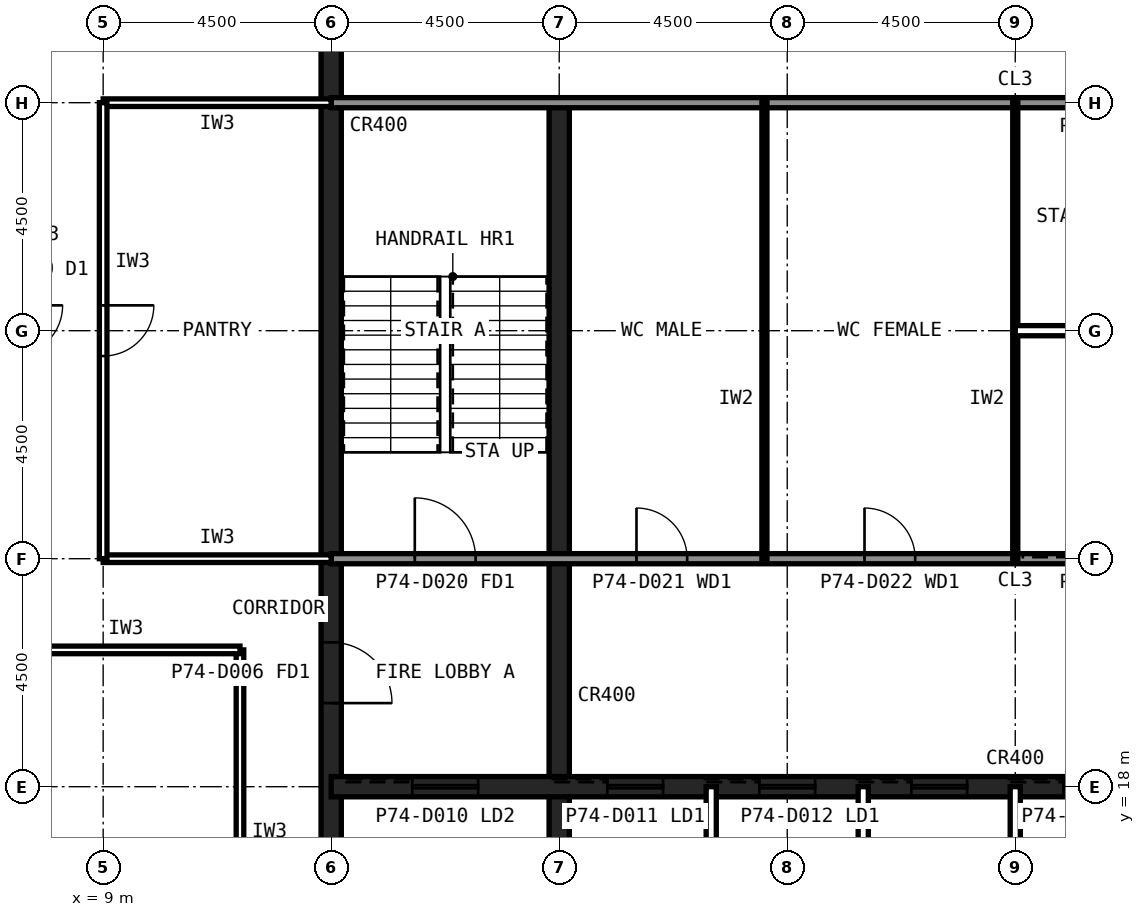
"""IFC4 building model, lengths in metres.
Left out: names, types, materials, properties, quantities, classifications, styles, units other than length and angle.
Written with IfcOpenShell. Run it as: python <this file> out.ifc"""

import sys

from ifc_helpers import new_model, si_unit, direction, frame, frame_2d, origin, place, context, subcontext, project, spatial, rectangle, extrude, element, fill, save


model = new_model("IFC4")
c1 = context("Model", 3, precision=1e-05, world=origin(), true_north=direction((0.0, 1.0)))
c2 = subcontext(c1, "Body", "Model", "MODEL_VIEW")
j1 = project(units=[si_unit("LENGTHUNIT", "METRE"), si_unit("PLANEANGLEUNIT", "RADIAN")], contexts=[c1])
p1 = place(None, origin())
s1 = spatial("IfcSite", under=j1, at=p1, CompositionType="ELEMENT")
p2 = place(p1, origin())
s2 = spatial("IfcBuilding", under=s1, at=p2, CompositionType="ELEMENT")
p3 = place(p2, frame((0.0, 0.0, 310.6)))
s3 = spatial("IfcBuildingStorey", under=s2, at=p3, CompositionType="ELEMENT", Elevation=310.6)
p4 = place(p3, frame((13.5, 40.5, 0.0), z_axis=(0.0, 0.0, 1.0), x_axis=(0.0, -1.0, 0.0)))
e1 = element("IfcWall", 1, at=p4, inside=s3, PredefinedType="SHEAR", context=c2, shape_type="SweptSolid", body=[
    extrude(rectangle(XDim=27.0, YDim=0.4, at=frame_2d((13.5, 0.0))), origin(), (0.0, 0.0, 1.0), 4.5),
])
p5 = place(p4, frame((19.65, 0.0, 0.0)))
e2 = element("IfcOpeningElement", 2, at=p5, cuts=e1, PredefinedType="OPENING", context=c2, shape_type="SweptSolid", body=[
    extrude(rectangle(XDim=1.2, YDim=2.1, at=frame_2d((0.6, 1.05))), frame((0.0, 0.21, 0.0), z_axis=(0.0, -1.0, 0.0), x_axis=(1.0, 0.0, 0.0)), (0.0, 0.0, 1.0), 0.42),
])
p6 = place(p4, frame((5.85, 0.0, 0.0)))
e3 = element("IfcOpeningElement", 3, at=p6, cuts=e1, PredefinedType="OPENING", context=c2, shape_type="SweptSolid", body=[
    extrude(rectangle(XDim=1.8, YDim=2.1, at=frame_2d((0.9, 1.05))), frame((0.0, 0.21, 0.0), z_axis=(0.0, -1.0, 0.0), x_axis=(1.0, 0.0, 0.0)), (0.0, 0.0, 1.0), 0.42),
])
p7 = place(p3, frame((18.0, 13.5, 0.0), z_axis=(0.0, 0.0, 1.0), x_axis=(0.0, 1.0, 0.0)))
e4 = element("IfcWall", 4, at=p7, inside=s3, PredefinedType="SHEAR", context=c2, shape_type="SweptSolid", body=[
    extrude(rectangle(XDim=18.0, YDim=0.4, at=frame_2d((9.0, 0.0))), origin(), (0.0, 0.0, 1.0), 4.5),
])
p8 = place(p3, frame((13.5, 18.0, 0.0), z_axis=(0.0, 0.0, 1.0), x_axis=(1.0, 0.0, 0.0)))
e5 = element("IfcWall", 5, at=p8, inside=s3, PredefinedType="SHEAR", context=c2, shape_type="SweptSolid", body=[
    extrude(rectangle(XDim=27.0, YDim=0.4, at=frame_2d((13.5, 0.0))), origin(), (0.0, 0.0, 1.0), 4.5),
])
p9 = place(p8, frame((24.3, 0.0, 0.0)))
e6 = element("IfcOpeningElement", 6, at=p9, cuts=e5, PredefinedType="OPENING", context=c2, shape_type="SweptSolid", body=[
    extrude(rectangle(XDim=0.9, YDim=2.1, at=frame_2d((0.45, 1.05))), frame((0.0, 0.21, 0.0), z_axis=(0.0, -1.0, 0.0), x_axis=(1.0, 0.0, 0.0)), (0.0, 0.0, 1.0), 0.42),
])
p10 = place(p8, frame((5.45, 0.0, 0.0)))
e7 = element("IfcOpeningElement", 7, at=p10, cuts=e5, PredefinedType="OPENING", context=c2, shape_type="SweptSolid", body=[
    extrude(rectangle(XDim=1.1, YDim=2.1, at=frame_2d((0.55, 1.05))), frame((0.0, 0.21, 0.0), z_axis=(0.0, -1.0, 0.0), x_axis=(1.0, 0.0, 0.0)), (0.0, 0.0, 1.0), 0.42),
])
p11 = place(p8, frame((8.45, 0.0, 0.0)))
e8 = element("IfcOpeningElement", 8, at=p11, cuts=e5, PredefinedType="OPENING", context=c2, shape_type="SweptSolid", body=[
    extrude(rectangle(XDim=1.1, YDim=2.1, at=frame_2d((0.55, 1.05))), frame((0.0, 0.21, 0.0), z_axis=(0.0, -1.0, 0.0), x_axis=(1.0, 0.0, 0.0)), (0.0, 0.0, 1.0), 0.42),
])
p12 = place(p8, frame((11.45, 0.0, 0.0)))
e9 = element("IfcOpeningElement", 9, at=p12, cuts=e5, PredefinedType="OPENING", context=c2, shape_type="SweptSolid", body=[
    extrude(rectangle(XDim=1.1, YDim=2.1, at=frame_2d((0.55, 1.05))), frame((0.0, 0.21, 0.0), z_axis=(0.0, -1.0, 0.0), x_axis=(1.0, 0.0, 0.0)), (0.0, 0.0, 1.0), 0.42),
])
p13 = place(p8, frame((14.45, 0.0, 0.0)))
e10 = element("IfcOpeningElement", 10, at=p13, cuts=e5, PredefinedType="OPENING", context=c2, shape_type="SweptSolid", body=[
    extrude(rectangle(XDim=1.1, YDim=2.1, at=frame_2d((0.55, 1.05))), frame((0.0, 0.21, 0.0), z_axis=(0.0, -1.0, 0.0), x_axis=(1.0, 0.0, 0.0)), (0.0, 0.0, 1.0), 0.42),
])
p14 = place(p8, frame((17.45, 0.0, 0.0)))
e11 = element("IfcOpeningElement", 11, at=p14, cuts=e5, PredefinedType="OPENING", context=c2, shape_type="SweptSolid", body=[
    extrude(rectangle(XDim=1.1, YDim=2.1, at=frame_2d((0.55, 1.05))), frame((0.0, 0.21, 0.0), z_axis=(0.0, -1.0, 0.0), x_axis=(1.0, 0.0, 0.0)), (0.0, 0.0, 1.0), 0.42),
])
p15 = place(p8, frame((20.45, 0.0, 0.0)))
e12 = element("IfcOpeningElement", 12, at=p15, cuts=e5, PredefinedType="OPENING", context=c2, shape_type="SweptSolid", body=[
    extrude(rectangle(XDim=1.1, YDim=2.1, at=frame_2d((0.55, 1.05))), frame((0.0, 0.21, 0.0), z_axis=(0.0, -1.0, 0.0), x_axis=(1.0, 0.0, 0.0)), (0.0, 0.0, 1.0), 0.42),
])
p16 = place(p8, frame((1.6, 0.0, 0.0)))
e13 = element("IfcOpeningElement", 13, at=p16, cuts=e5, PredefinedType="OPENING", context=c2, shape_type="SweptSolid", body=[
    extrude(rectangle(XDim=1.3, YDim=2.2, at=frame_2d((0.65, 1.1))), frame((0.0, 0.21, 0.0), z_axis=(0.0, -1.0, 0.0), x_axis=(1.0, 0.0, 0.0)), (0.0, 0.0, 1.0), 0.42),
])
p17 = place(p3, frame((13.5, 22.5, 0.0), z_axis=(0.0, 0.0, 1.0), x_axis=(1.0, 0.0, 0.0)))
e14 = element("IfcWall", 14, at=p17, inside=s3, PredefinedType="SOLIDWALL", context=c2, shape_type="SweptSolid", body=[
    extrude(rectangle(XDim=27.0, YDim=0.2, at=frame_2d((13.5, 0.0))), origin(), (0.0, 0.0, 1.0), 4.32),
])
p18 = place(p17, frame((1.65, 0.0, 0.0)))
e15 = element("IfcOpeningElement", 15, at=p18, cuts=e14, PredefinedType="OPENING", context=c2, shape_type="SweptSolid", body=[
    extrude(rectangle(XDim=1.2, YDim=2.1, at=frame_2d((0.6, 1.05))), frame((0.0, 0.11, 0.0), z_axis=(0.0, -1.0, 0.0), x_axis=(1.0, 0.0, 0.0)), (0.0, 0.0, 1.0), 0.22),
])
p19 = place(p17, frame((6.025, 0.0, 0.0)))
e16 = element("IfcOpeningElement", 16, at=p19, cuts=e14, PredefinedType="OPENING", context=c2, shape_type="SweptSolid", body=[
    extrude(rectangle(XDim=1.0, YDim=2.1, at=frame_2d((0.5, 1.05))), frame((0.0, 0.11, 0.0), z_axis=(0.0, -1.0, 0.0), x_axis=(1.0, 0.0, 0.0)), (0.0, 0.0, 1.0), 0.22),
])
p20 = place(p17, frame((10.525, 0.0, 0.0)))
e17 = element("IfcOpeningElement", 17, at=p20, cuts=e14, PredefinedType="OPENING", context=c2, shape_type="SweptSolid", body=[
    extrude(rectangle(XDim=1.0, YDim=2.1, at=frame_2d((0.5, 1.05))), frame((0.0, 0.11, 0.0), z_axis=(0.0, -1.0, 0.0), x_axis=(1.0, 0.0, 0.0)), (0.0, 0.0, 1.0), 0.22),
])
p21 = place(p17, frame((19.75, 0.0, 0.0)))
e18 = element("IfcOpeningElement", 18, at=p21, cuts=e14, PredefinedType="OPENING", context=c2, shape_type="SweptSolid", body=[
    extrude(rectangle(XDim=1.0, YDim=2.1, at=frame_2d((0.5, 1.05))), frame((0.0, 0.11, 0.0), z_axis=(0.0, -1.0, 0.0), x_axis=(1.0, 0.0, 0.0)), (0.0, 0.0, 1.0), 0.22),
])
p22 = place(p17, frame((15.05, 0.0, 0.0)))
e19 = element("IfcOpeningElement", 19, at=p22, cuts=e14, PredefinedType="OPENING", context=c2, shape_type="SweptSolid", body=[
    extrude(rectangle(XDim=1.4, YDim=2.4, at=frame_2d((0.7, 1.2))), frame((0.0, 0.11, 0.0), z_axis=(0.0, -1.0, 0.0), x_axis=(1.0, 0.0, 0.0)), (0.0, 0.0, 1.0), 0.22),
])
p23 = place(p3, frame((13.5, 31.5, 0.0), z_axis=(0.0, 0.0, 1.0), x_axis=(1.0, 0.0, 0.0)))
e20 = element("IfcWall", 20, at=p23, inside=s3, PredefinedType="SOLIDWALL", context=c2, shape_type="SweptSolid", body=[
    extrude(rectangle(XDim=27.0, YDim=0.2, at=frame_2d((13.5, 0.0))), origin(), (0.0, 0.0, 1.0), 4.32),
])
p24 = place(p23, frame((24.15, 0.0, 0.0)))
e21 = element("IfcOpeningElement", 21, at=p24, cuts=e20, PredefinedType="OPENING", context=c2, shape_type="SweptSolid", body=[
    extrude(rectangle(XDim=1.2, YDim=2.1, at=frame_2d((0.6, 1.05))), frame((0.0, 0.11, 0.0), z_axis=(0.0, -1.0, 0.0), x_axis=(1.0, 0.0, 0.0)), (0.0, 0.0, 1.0), 0.22),
])
p25 = place(p23, frame((15.3, 0.0, 0.0)))
e22 = element("IfcOpeningElement", 22, at=p25, cuts=e20, PredefinedType="OPENING", context=c2, shape_type="SweptSolid", body=[
    extrude(rectangle(XDim=0.9, YDim=2.1, at=frame_2d((0.45, 1.05))), frame((0.0, 0.11, 0.0), z_axis=(0.0, -1.0, 0.0), x_axis=(1.0, 0.0, 0.0)), (0.0, 0.0, 1.0), 0.22),
])
p26 = place(p23, frame((19.8, 0.0, 0.0)))
e23 = element("IfcOpeningElement", 23, at=p26, cuts=e20, PredefinedType="OPENING", context=c2, shape_type="SweptSolid", body=[
    extrude(rectangle(XDim=0.9, YDim=2.1, at=frame_2d((0.45, 1.05))), frame((0.0, 0.11, 0.0), z_axis=(0.0, -1.0, 0.0), x_axis=(1.0, 0.0, 0.0)), (0.0, 0.0, 1.0), 0.22),
])
for number, where, z_axis, x_axis in (
    (24, (21.0, 13.5, 0.0), (0.0, 0.0, 1.0), (0.0, 1.0, 0.0)),
    (25, (24.0, 13.5, 0.0), (0.0, 0.0, 1.0), (0.0, 1.0, 0.0)),
    (26, (27.0, 13.5, 0.0), (0.0, 0.0, 1.0), (0.0, 1.0, 0.0)),
):
    element("IfcWall", number, at=place(p3, frame(where, z_axis=z_axis, x_axis=x_axis)), inside=s3, PredefinedType="PARTITIONING", context=c2, shape_type="SweptSolid", body=[
        extrude(rectangle(XDim=4.5, YDim=0.2, at=frame_2d((2.25, 0.0))), origin(), (0.0, 0.0, 1.0), 4.32),
    ])
for number, where, z_axis, x_axis in (
    (27, (22.05, 22.5, 0.0), (0.0, 0.0, 1.0), (0.0, 1.0, 0.0)),
    (28, (27.0, 22.5, 0.0), (0.0, 0.0, 1.0), (0.0, 1.0, 0.0)),
):
    element("IfcWall", number, at=place(p3, frame(where, z_axis=z_axis, x_axis=x_axis)), inside=s3, PredefinedType="PLUMBINGWALL", context=c2, shape_type="SweptSolid", body=[
        extrude(rectangle(XDim=9.0, YDim=0.1, at=frame_2d((4.5, 0.0))), origin(), (0.0, 0.0, 1.0), 4.32),
    ])
p27 = place(p3, frame((27.0, 27.0, 0.0), z_axis=(0.0, 0.0, 1.0), x_axis=(1.0, 0.0, 0.0)))
e29 = element("IfcWall", 29, at=p27, inside=s3, PredefinedType="PARTITIONING", context=c2, shape_type="SweptSolid", body=[
    extrude(rectangle(XDim=9.0, YDim=0.2, at=frame_2d((4.5, 0.0))), origin(), (0.0, 0.0, 1.0), 4.32),
])
p28 = place(p3, frame((11.7, 20.7, 0.0), z_axis=(0.0, 0.0, 1.0), x_axis=(0.0, -1.0, 0.0)))
e30 = element("IfcWall", 30, at=p28, inside=s3, PredefinedType="PARTITIONING", context=c2, shape_type="SweptSolid", body=[
    extrude(rectangle(XDim=7.2, YDim=0.15, at=frame_2d((3.6, 0.0))), origin(), (0.0, 0.0, 1.0), 4.32),
])
p29 = place(p3, frame((7.2, 20.7, 0.0), z_axis=(0.0, 0.0, 1.0), x_axis=(1.0, 0.0, 0.0)))
e31 = element("IfcWall", 31, at=p29, inside=s3, PredefinedType="PARTITIONING", context=c2, shape_type="SweptSolid", body=[
    extrude(rectangle(XDim=4.5, YDim=0.15, at=frame_2d((2.25, 0.0))), origin(), (0.0, 0.0, 1.0), 4.32),
])
for number, where, z_axis, x_axis in (
    (32, (9.0, 22.5, 0.0), (0.0, 0.0, 1.0), (1.0, 0.0, 0.0)),
    (33, (13.5, 31.5, 0.0), (0.0, 0.0, 1.0), (-1.0, 0.0, 0.0)),
):
    element("IfcWall", number, at=place(p3, frame(where, z_axis=z_axis, x_axis=x_axis)), inside=s3, PredefinedType="PARTITIONING", context=c2, shape_type="SweptSolid", body=[
        extrude(rectangle(XDim=4.5, YDim=0.15, at=frame_2d((2.25, 0.0))), origin(), (0.0, 0.0, 1.0), 3.393),
    ])
p30 = place(p3, frame((9.0, 31.5, 0.0), z_axis=(0.0, 0.0, 1.0), x_axis=(0.0, -1.0, 0.0)))
e34 = element("IfcWall", 34, at=p30, inside=s3, PredefinedType="PARTITIONING", context=c2, shape_type="SweptSolid", body=[
    extrude(rectangle(XDim=9.0, YDim=0.15, at=frame_2d((4.5, 0.0))), origin(), (0.0, 0.0, 1.0), 4.32),
])
p31 = place(p30, frame((4.0, 0.0, 0.0)))
e35 = element("IfcOpeningElement", 35, at=p31, cuts=e34, PredefinedType="OPENING", context=c2, shape_type="SweptSolid", body=[
    extrude(rectangle(XDim=1.0, YDim=2.1, at=frame_2d((0.5, 1.05))), frame((0.0, 0.085, 0.0), z_axis=(0.0, -1.0, 0.0), x_axis=(1.0, 0.0, 0.0)), (0.0, 0.0, 1.0), 0.17),
])
p32 = place(p5, origin())
e36 = element("IfcDoor", 36, at=p32, inside=s3, OperationType="SINGLE_SWING_RIGHT", PredefinedType="DOOR", context=c2, shape_type="SweptSolid", body=[
    extrude(rectangle(XDim=1.2, YDim=2.1, at=frame_2d((0.6, 1.05))), frame((0.0, 0.025, 0.0), z_axis=(0.0, -1.0, 0.0), x_axis=(1.0, 0.0, 0.0)), (0.0, 0.0, 1.0), 0.05),
])
fill(e2, e36)
p33 = place(p18, origin())
e37 = element("IfcDoor", 37, at=p33, inside=s3, OperationType="SINGLE_SWING_LEFT", PredefinedType="DOOR", context=c2, shape_type="SweptSolid", body=[
    extrude(rectangle(XDim=1.2, YDim=2.1, at=frame_2d((0.6, 1.05))), frame((0.0, 0.025, 0.0), z_axis=(0.0, -1.0, 0.0), x_axis=(1.0, 0.0, 0.0)), (0.0, 0.0, 1.0), 0.05),
])
fill(e15, e37)
p34 = place(p19, origin())
e38 = element("IfcDoor", 38, at=p34, inside=s3, OperationType="SINGLE_SWING_LEFT", PredefinedType="DOOR", context=c2, shape_type="SweptSolid", body=[
    extrude(rectangle(XDim=1.0, YDim=2.1, at=frame_2d((0.5, 1.05))), frame((0.0, 0.025, 0.0), z_axis=(0.0, -1.0, 0.0), x_axis=(1.0, 0.0, 0.0)), (0.0, 0.0, 1.0), 0.05),
])
fill(e16, e38)
p35 = place(p20, origin())
e39 = element("IfcDoor", 39, at=p35, inside=s3, OperationType="SINGLE_SWING_LEFT", PredefinedType="DOOR", context=c2, shape_type="SweptSolid", body=[
    extrude(rectangle(XDim=1.0, YDim=2.1, at=frame_2d((0.5, 1.05))), frame((0.0, 0.025, 0.0), z_axis=(0.0, -1.0, 0.0), x_axis=(1.0, 0.0, 0.0)), (0.0, 0.0, 1.0), 0.05),
])
fill(e17, e39)
p36 = place(p10, origin())
e40 = element("IfcDoor", 40, at=p36, inside=s3, OperationType="SLIDING_TO_LEFT", PredefinedType="DOOR", context=c2, shape_type="SweptSolid", body=[
    extrude(rectangle(XDim=1.1, YDim=2.1, at=frame_2d((0.55, 1.05))), frame((0.0, 0.025, 0.0), z_axis=(0.0, -1.0, 0.0), x_axis=(1.0, 0.0, 0.0)), (0.0, 0.0, 1.0), 0.05),
])
fill(e7, e40)
p37 = place(p11, origin())
e41 = element("IfcDoor", 41, at=p37, inside=s3, OperationType="SLIDING_TO_LEFT", PredefinedType="DOOR", context=c2, shape_type="SweptSolid", body=[
    extrude(rectangle(XDim=1.1, YDim=2.1, at=frame_2d((0.55, 1.05))), frame((0.0, 0.025, 0.0), z_axis=(0.0, -1.0, 0.0), x_axis=(1.0, 0.0, 0.0)), (0.0, 0.0, 1.0), 0.05),
])
fill(e8, e41)
p38 = place(p12, origin())
e42 = element("IfcDoor", 42, at=p38, inside=s3, OperationType="SLIDING_TO_LEFT", PredefinedType="DOOR", context=c2, shape_type="SweptSolid", body=[
    extrude(rectangle(XDim=1.1, YDim=2.1, at=frame_2d((0.55, 1.05))), frame((0.0, 0.025, 0.0), z_axis=(0.0, -1.0, 0.0), x_axis=(1.0, 0.0, 0.0)), (0.0, 0.0, 1.0), 0.05),
])
fill(e9, e42)
p39 = place(p13, origin())
e43 = element("IfcDoor", 43, at=p39, inside=s3, OperationType="SLIDING_TO_LEFT", PredefinedType="DOOR", context=c2, shape_type="SweptSolid", body=[
    extrude(rectangle(XDim=1.1, YDim=2.1, at=frame_2d((0.55, 1.05))), frame((0.0, 0.025, 0.0), z_axis=(0.0, -1.0, 0.0), x_axis=(1.0, 0.0, 0.0)), (0.0, 0.0, 1.0), 0.05),
])
fill(e10, e43)
p40 = place(p16, origin())
e44 = element("IfcDoor", 44, at=p40, inside=s3, OperationType="SLIDING_TO_LEFT", PredefinedType="DOOR", context=c2, shape_type="SweptSolid", body=[
    extrude(rectangle(XDim=1.3, YDim=2.2, at=frame_2d((0.65, 1.1))), frame((0.0, 0.025, 0.0), z_axis=(0.0, -1.0, 0.0), x_axis=(1.0, 0.0, 0.0)), (0.0, 0.0, 1.0), 0.05),
])
fill(e13, e44)
p41 = place(p31, origin())
e45 = element("IfcDoor", 45, at=p41, inside=s3, OperationType="SINGLE_SWING_LEFT", PredefinedType="DOOR", context=c2, shape_type="SweptSolid", body=[
    extrude(rectangle(XDim=1.0, YDim=2.1, at=frame_2d((0.5, 1.05))), frame((0.0, 0.025, 0.0), z_axis=(0.0, -1.0, 0.0), x_axis=(1.0, 0.0, 0.0)), (0.0, 0.0, 1.0), 0.05),
])
fill(e35, e45)
save(model, sys.argv[1])
